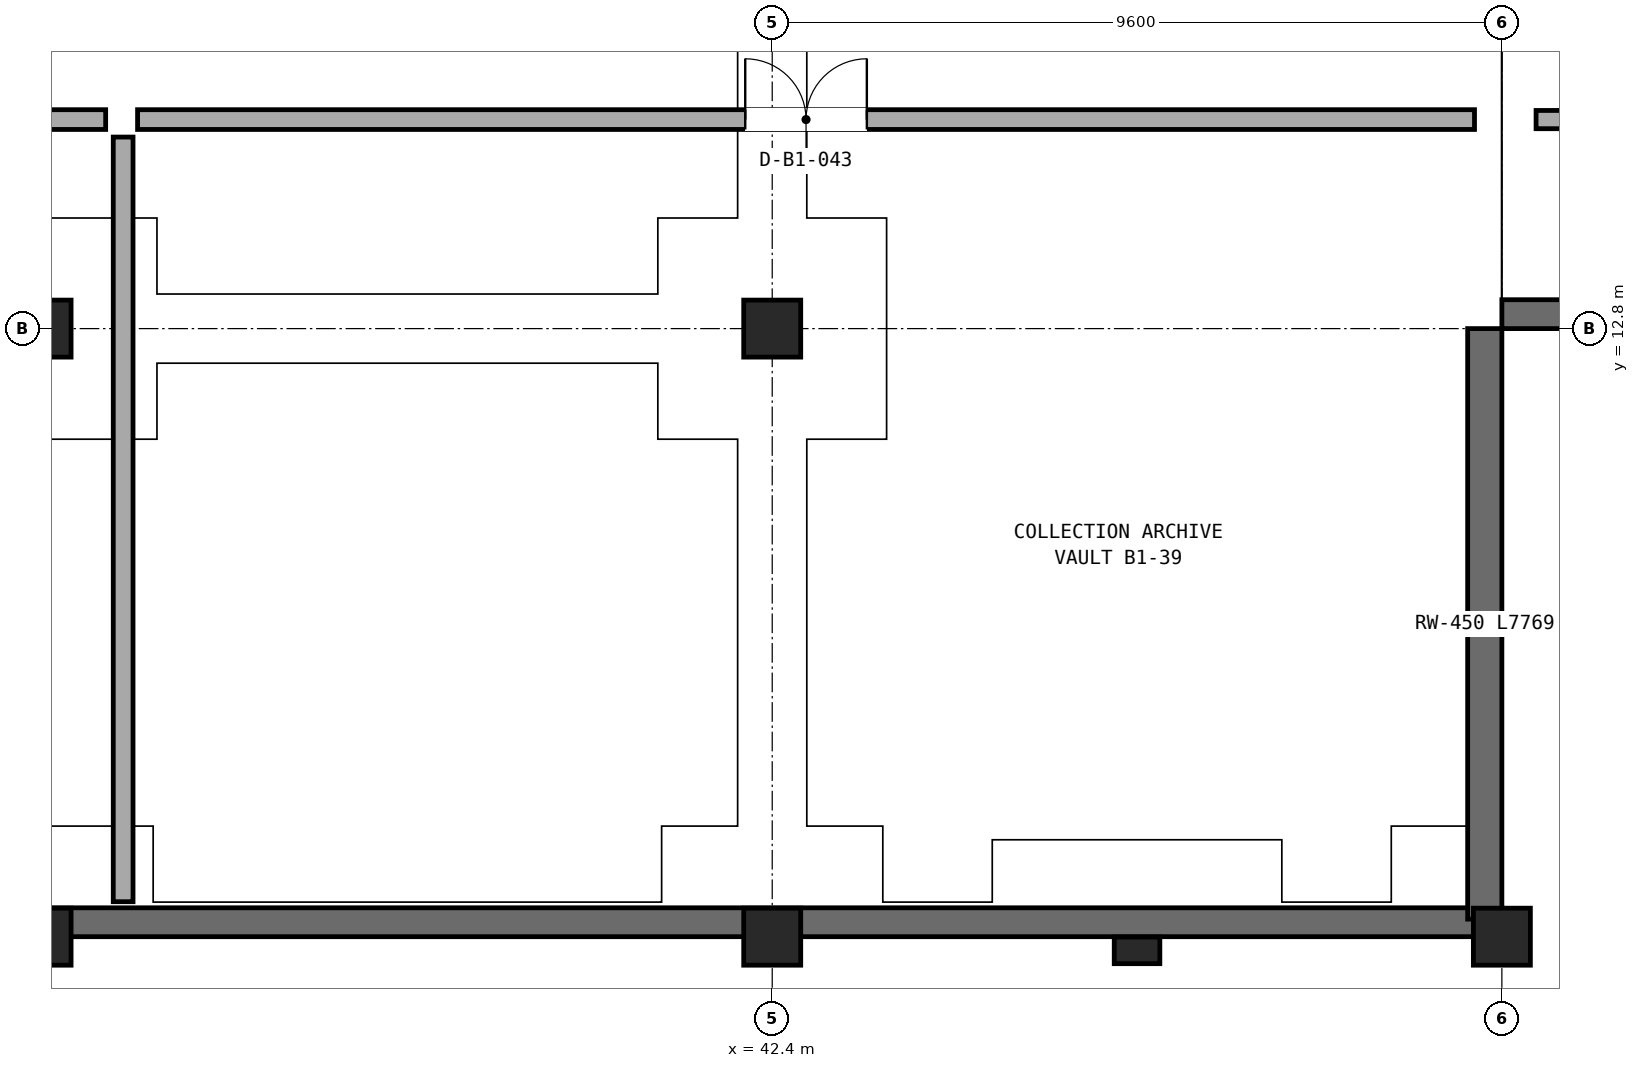
"""IFC4 building model, lengths in metres.
Left out: names, types, materials, properties, quantities, classifications, styles, units other than length and angle.
Written with IfcOpenShell. Run it as: python <this file> out.ifc"""

import sys

from ifc_helpers import new_model, si_unit, direction, frame, frame_2d, origin, origin_2d, place, context, subcontext, project, spatial, rectangle, extrude, element, fill, save


model = new_model("IFC4")
c1 = context("Model", 3, precision=1e-05, world=origin(), true_north=direction((0.0, 1.0)))
c2 = subcontext(c1, "Body", "Model", "MODEL_VIEW")
j1 = project(units=[si_unit("LENGTHUNIT", "METRE"), si_unit("PLANEANGLEUNIT", "RADIAN")], contexts=[c1])
p1 = place(None, origin())
s1 = spatial("IfcSite", under=j1, at=p1, CompositionType="ELEMENT")
p2 = place(p1, origin())
s2 = spatial("IfcBuilding", under=s1, at=p2, CompositionType="ELEMENT")
p3 = place(p2, frame((0.0, 0.0, -5.4)))
s3 = spatial("IfcBuildingStorey", under=s2, at=p3, CompositionType="ELEMENT", Elevation=-5.4)
for number, where, z_axis, x_axis in (
    (1, (32.8, 4.8, 0.0), (0.0, 0.0, 1.0), (1.0, 0.0, 0.0)),
    (2, (32.8, 12.8, 0.0), (0.0, 0.0, 1.0), (1.0, 0.0, 0.0)),
    (3, (42.4, 4.8, 0.0), (0.0, 0.0, 1.0), (1.0, 0.0, 0.0)),
    (4, (42.4, 12.8, 0.0), (0.0, 0.0, 1.0), (1.0, 0.0, 0.0)),
    (5, (52.0, 4.8, 0.0), (0.0, 0.0, 1.0), (1.0, 0.0, 0.0)),
):
    element("IfcColumn", number, at=place(p3, frame(where, z_axis=z_axis, x_axis=x_axis)), inside=s3, PredefinedType="COLUMN", context=c2, shape_type="SweptSolid", body=[
        extrude(rectangle(XDim=0.75, YDim=0.75, at=origin_2d()), origin(), (0.0, 0.0, 1.0), 5.4),
    ])
p4 = place(p3, frame((47.2, 4.62, 0.0), z_axis=(0.0, 0.0, 1.0), x_axis=(1.0, 0.0, 0.0)))
e6 = element("IfcColumn", 6, at=p4, inside=s3, PredefinedType="PILASTER", context=c2, shape_type="SweptSolid", body=[
    extrude(rectangle(XDim=0.6, YDim=0.35, at=origin_2d()), origin(), (0.0, 0.0, 1.0), 5.4),
])
p5 = place(p3, frame((4.996, 4.99, 0.0), z_axis=(0.0, 0.0, 1.0), x_axis=(1.0, 0.0, 0.0)))
e7 = element("IfcWall", 7, at=p5, inside=s3, PredefinedType="USERDEFINED", context=c2, shape_type="SweptSolid", body=[
    extrude(rectangle(XDim=47.004, YDim=0.38, at=frame_2d((23.502, 0.0))), origin(), (0.0, 0.0, 1.0), 5.06),
])
p6 = place(p3, frame((51.775, 5.031, 0.0), z_axis=(0.0, 0.0, 1.0), x_axis=(0.0, 1.0, 0.0)))
e8 = element("IfcWall", 8, at=p6, inside=s3, PredefinedType="USERDEFINED", context=c2, shape_type="SweptSolid", body=[
    extrude(rectangle(XDim=7.769, YDim=0.45, at=frame_2d((3.885, 0.0))), origin(), (0.0, 0.0, 1.0), 5.06),
])
p7 = place(p3, frame((52.0, 12.99, 0.0), z_axis=(0.0, 0.0, 1.0), x_axis=(1.0, 0.0, 0.0)))
e9 = element("IfcWall", 9, at=p7, inside=s3, PredefinedType="USERDEFINED", context=c2, shape_type="SweptSolid", body=[
    extrude(rectangle(XDim=28.8, YDim=0.38, at=frame_2d((14.4, 0.0))), origin(), (0.0, 0.0, 1.0), 5.06),
])
p8 = place(p3, frame((52.45, 15.55, 0.0), z_axis=(0.0, 0.0, 1.0), x_axis=(1.0, 0.0, 0.0)))
e10 = element("IfcWall", 10, at=p8, inside=s3, PredefinedType="SOLIDWALL", context=c2, shape_type="SweptSolid", body=[
    extrude(rectangle(XDim=18.78, YDim=0.24, at=frame_2d((9.39, 0.0))), origin(), (0.0, 0.0, 1.0), 5.03),
])
p9 = place(p8, frame((8.765, 0.0, 0.0)))
e11 = element("IfcOpeningElement", 11, at=p9, cuts=e10, PredefinedType="OPENING", context=c2, shape_type="SweptSolid", body=[
    extrude(rectangle(XDim=1.25, YDim=2.2, at=frame_2d((0.625, 1.1))), frame((0.0, 0.13, 0.0), z_axis=(0.0, -1.0, 0.0), x_axis=(1.0, 0.0, 0.0)), (0.0, 0.0, 1.0), 0.26),
])
p10 = place(p3, frame((14.36, 15.55, 0.0), z_axis=(0.0, 0.0, 1.0), x_axis=(1.0, 0.0, 0.0)))
e12 = element("IfcWall", 12, at=p10, inside=s3, PredefinedType="SOLIDWALL", context=c2, shape_type="SweptSolid", body=[
    extrude(rectangle(XDim=19.27, YDim=0.26, at=frame_2d((9.635, 0.0))), origin(), (0.0, 0.0, 1.0), 4.507),
])
p11 = place(p10, frame((8.835, 0.0, 0.0)))
e13 = element("IfcOpeningElement", 13, at=p11, cuts=e12, PredefinedType="OPENING", context=c2, shape_type="SweptSolid", body=[
    extrude(rectangle(XDim=1.6, YDim=2.4, at=frame_2d((0.8, 1.2))), frame((0.0, 0.14, 0.0), z_axis=(0.0, -1.0, 0.0), x_axis=(1.0, 0.0, 0.0)), (0.0, 0.0, 1.0), 0.28),
])
p12 = place(p3, frame((34.05, 15.55, 0.0), z_axis=(0.0, 0.0, 1.0), x_axis=(1.0, 0.0, 0.0)))
e14 = element("IfcWall", 14, at=p12, inside=s3, PredefinedType="SOLIDWALL", context=c2, shape_type="SweptSolid", body=[
    extrude(rectangle(XDim=17.59, YDim=0.26, at=frame_2d((8.795, 0.0))), origin(), (0.0, 0.0, 1.0), 4.507),
])
p13 = place(p12, frame((7.995, 0.0, 0.0)))
e15 = element("IfcOpeningElement", 15, at=p13, cuts=e14, PredefinedType="OPENING", context=c2, shape_type="SweptSolid", body=[
    extrude(rectangle(XDim=1.6, YDim=2.4, at=frame_2d((0.8, 1.2))), frame((0.0, 0.14, 0.0), z_axis=(0.0, -1.0, 0.0), x_axis=(1.0, 0.0, 0.0)), (0.0, 0.0, 1.0), 0.28),
])
p14 = place(p3, frame((33.86, 15.32, 0.0), z_axis=(0.0, 0.0, 1.0), x_axis=(0.0, -1.0, 0.0)))
e16 = element("IfcWall", 16, at=p14, inside=s3, PredefinedType="SOLIDWALL", context=c2, shape_type="SweptSolid", body=[
    extrude(rectangle(XDim=10.06, YDim=0.26, at=frame_2d((5.03, 0.0))), origin(), (0.0, 0.0, 1.0), 4.428),
])
p15 = place(p13, origin())
e17 = element("IfcDoor", 17, at=p15, inside=s3, OperationType="DOUBLE_DOOR_SINGLE_SWING", PredefinedType="DOOR", context=c2, shape_type="SweptSolid", body=[
    extrude(rectangle(XDim=1.6, YDim=2.4, at=frame_2d((0.8, 1.2))), frame((0.0, 0.025, 0.0), z_axis=(0.0, -1.0, 0.0), x_axis=(1.0, 0.0, 0.0)), (0.0, 0.0, 1.0), 0.05),
])
fill(e15, e17)
save(model, sys.argv[1])
